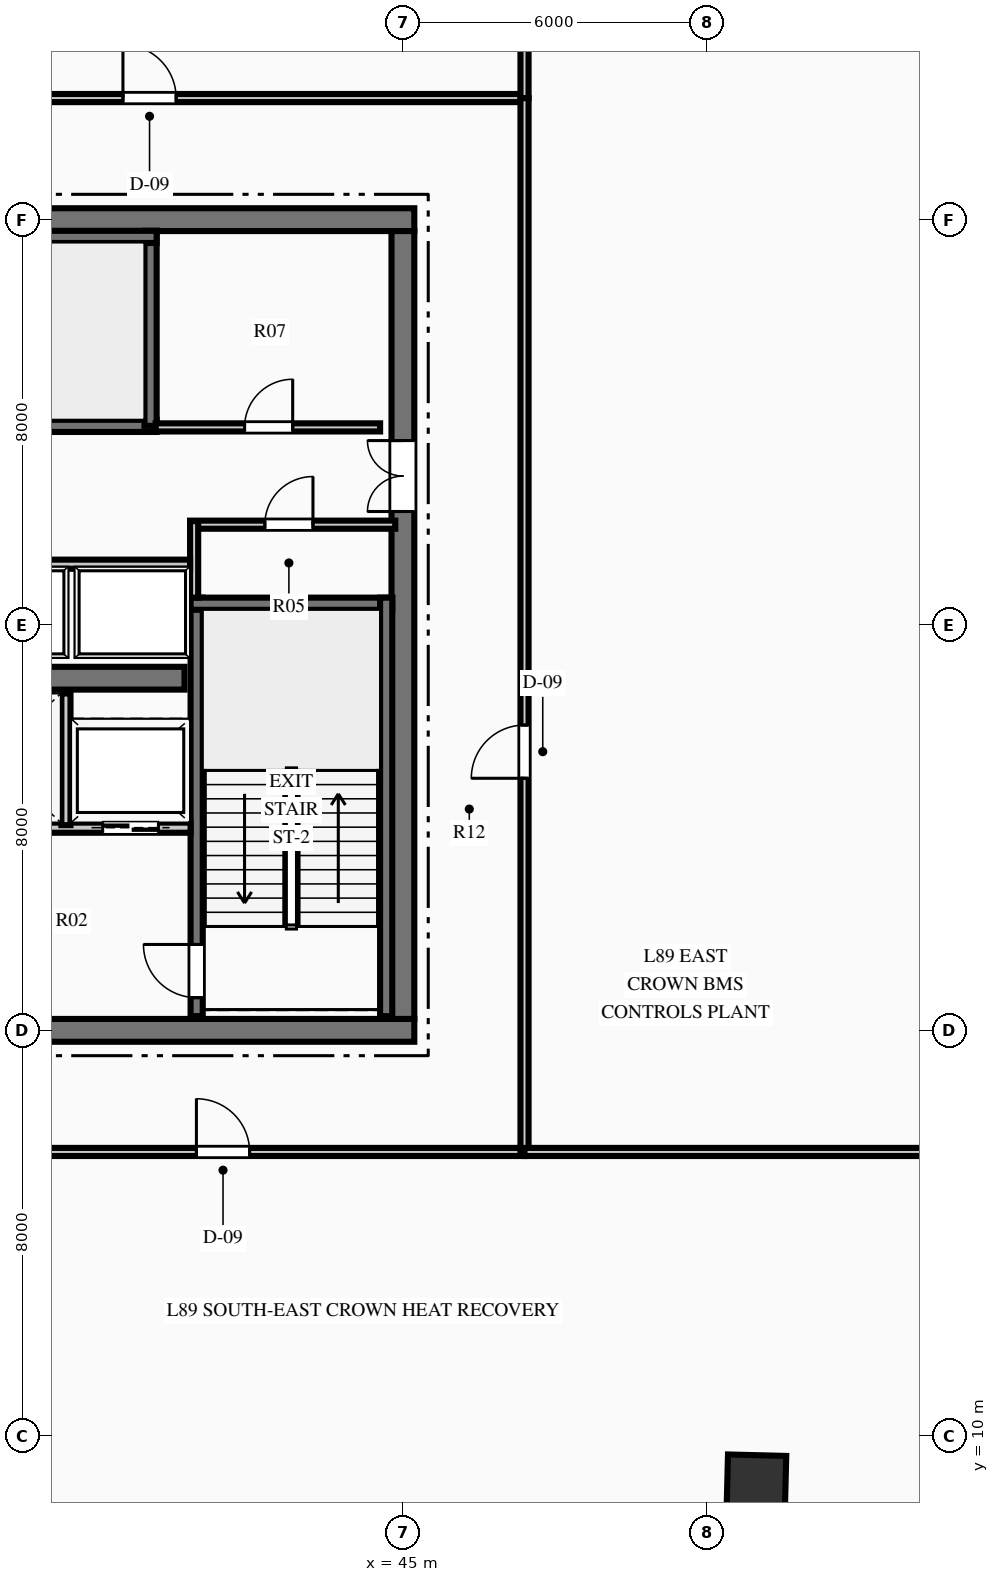
"""IFC4 building model, lengths in metres.
Left out: names, types, materials, properties, quantities, classifications, styles, units other than length and angle.
Written with IfcOpenShell. Run it as: python <this file> out.ifc"""

import sys

from ifc_helpers import new_model, si_unit, direction, frame, frame_2d, origin, origin_2d, place, context, subcontext, project, spatial, rectangle, hollow_rectangle, extrude, element, fill, save


model = new_model("IFC4")
c1 = context("Model", 3, precision=1e-05, world=origin(), true_north=direction((0.0, 1.0)))
c2 = subcontext(c1, "Body", "Model", "MODEL_VIEW")
j1 = project(units=[si_unit("LENGTHUNIT", "METRE"), si_unit("PLANEANGLEUNIT", "RADIAN")], contexts=[c1])
p1 = place(None, origin())
s1 = spatial("IfcSite", under=j1, at=p1, CompositionType="ELEMENT")
p2 = place(p1, origin())
s2 = spatial("IfcBuilding", under=s1, at=p2, CompositionType="ELEMENT")
p3 = place(p2, frame((0.0, 0.0, 352.2)))
s3 = spatial("IfcBuildingStorey", under=s2, at=p3, CompositionType="ELEMENT", Elevation=352.2)
p4 = place(p3, frame((26.775, 18.0, 0.0), z_axis=(0.0, 0.0, 1.0), x_axis=(1.0, 0.0, 0.0)))
e1 = element("IfcWall", 1, at=p4, inside=s3, PredefinedType="SHEAR", context=c2, shape_type="SweptSolid", body=[
    extrude(rectangle(XDim=18.45, YDim=0.45, at=frame_2d((9.225, 0.0))), origin(), (0.0, 0.0, 1.0), 4.2),
])
p5 = place(p4, frame((7.325, 0.0, 0.0)))
e2 = element("IfcOpeningElement", 2, at=p5, cuts=e1, PredefinedType="OPENING", context=c2, shape_type="SweptSolid", body=[
    extrude(rectangle(XDim=1.1, YDim=2.15, at=frame_2d((0.55, 1.075))), frame((0.0, 0.235, 0.0), z_axis=(0.0, -1.0, 0.0), x_axis=(1.0, 0.0, 0.0)), (0.0, 0.0, 1.0), 0.47),
])
p6 = place(p4, frame((9.505, 0.0, 0.0)))
e3 = element("IfcOpeningElement", 3, at=p6, cuts=e1, PredefinedType="OPENING", context=c2, shape_type="SweptSolid", body=[
    extrude(rectangle(XDim=1.1, YDim=2.15, at=frame_2d((0.55, 1.075))), frame((0.0, 0.235, 0.0), z_axis=(0.0, -1.0, 0.0), x_axis=(1.0, 0.0, 0.0)), (0.0, 0.0, 1.0), 0.47),
])
p7 = place(p3, frame((26.775, 34.0, 0.0), z_axis=(0.0, 0.0, 1.0), x_axis=(1.0, 0.0, 0.0)))
e4 = element("IfcWall", 4, at=p7, inside=s3, PredefinedType="SHEAR", context=c2, shape_type="SweptSolid", body=[
    extrude(rectangle(XDim=18.45, YDim=0.45, at=frame_2d((9.225, 0.0))), origin(), (0.0, 0.0, 1.0), 4.2),
])
p8 = place(p3, frame((45.0, 18.225, 0.0), z_axis=(0.0, 0.0, 1.0), x_axis=(0.0, 1.0, 0.0)))
e5 = element("IfcWall", 5, at=p8, inside=s3, PredefinedType="SHEAR", context=c2, shape_type="SweptSolid", body=[
    extrude(rectangle(XDim=15.55, YDim=0.45, at=frame_2d((7.775, 0.0))), origin(), (0.0, 0.0, 1.0), 4.2),
])
p9 = place(p8, frame((10.015, 0.0, 0.0)))
e6 = element("IfcOpeningElement", 6, at=p9, cuts=e5, PredefinedType="OPENING", context=c2, shape_type="SweptSolid", body=[
    extrude(rectangle(XDim=1.4, YDim=2.2, at=frame_2d((0.7, 1.1))), frame((0.0, 0.235, 0.0), z_axis=(0.0, -1.0, 0.0), x_axis=(1.0, 0.0, 0.0)), (0.0, 0.0, 1.0), 0.47),
])
p10 = place(p3, frame((31.31, 24.95, 0.0), z_axis=(0.0, 0.0, 1.0), x_axis=(1.0, 0.0, 0.0)))
e7 = element("IfcWall", 7, at=p10, inside=s3, PredefinedType="SHEAR", context=c2, shape_type="SweptSolid", body=[
    extrude(rectangle(XDim=9.38, YDim=0.45, at=frame_2d((4.69, 0.0))), origin(), (0.0, 0.0, 1.0), 4.2),
])
p11 = place(p3, frame((40.93, 18.28, 0.0), z_axis=(0.0, 0.0, 1.0), x_axis=(0.0, 1.0, 0.0)))
e8 = element("IfcWall", 8, at=p11, inside=s3, PredefinedType="SHEAR", context=c2, shape_type="SweptSolid", body=[
    extrude(rectangle(XDim=8.26, YDim=0.24, at=frame_2d((4.13, 0.0))), origin(), (0.0, 0.0, 1.0), 4.2),
])
p12 = place(p11, frame((0.365, 0.0, 0.0)))
e9 = element("IfcOpeningElement", 9, at=p12, cuts=e8, PredefinedType="OPENING", context=c2, shape_type="SweptSolid", body=[
    extrude(rectangle(XDim=1.05, YDim=2.15, at=frame_2d((0.525, 1.075))), frame((0.0, 0.13, 0.0), z_axis=(0.0, -1.0, 0.0), x_axis=(1.0, 0.0, 0.0)), (0.0, 0.0, 1.0), 0.26),
])
p13 = place(p3, frame((40.81, 26.42, 0.0), z_axis=(0.0, 0.0, 1.0), x_axis=(1.0, 0.0, 0.0)))
e10 = element("IfcWall", 10, at=p13, inside=s3, PredefinedType="SHEAR", context=c2, shape_type="SweptSolid", body=[
    extrude(rectangle(XDim=3.98, YDim=0.24, at=frame_2d((1.99, 0.0))), origin(), (0.0, 0.0, 1.0), 4.2),
])
p14 = place(p3, frame((44.67, 18.28, 0.0), z_axis=(0.0, 0.0, 1.0), x_axis=(0.0, 1.0, 0.0)))
e11 = element("IfcWall", 11, at=p14, inside=s3, PredefinedType="SHEAR", context=c2, shape_type="SweptSolid", body=[
    extrude(rectangle(XDim=8.26, YDim=0.24, at=frame_2d((4.13, 0.0))), origin(), (0.0, 0.0, 1.0), 4.2),
])
p15 = place(p3, frame((31.76, 29.93, 0.0), z_axis=(0.0, 0.0, 1.0), x_axis=(1.0, 0.0, 0.0)))
e12 = element("IfcWall", 12, at=p15, inside=s3, PredefinedType="SHEAR", context=c2, shape_type="SweptSolid", body=[
    extrude(rectangle(XDim=8.38, YDim=0.24, at=frame_2d((4.19, 0.0))), origin(), (0.0, 0.0, 1.0), 4.2),
])
p16 = place(p15, frame((0.565, 0.0, 0.0)))
e13 = element("IfcOpeningElement", 13, at=p16, cuts=e12, PredefinedType="OPENING", context=c2, shape_type="SweptSolid", body=[
    extrude(rectangle(XDim=1.05, YDim=2.15, at=frame_2d((0.525, 1.075))), frame((0.0, 0.13, 0.0), z_axis=(0.0, -1.0, 0.0), x_axis=(1.0, 0.0, 0.0)), (0.0, 0.0, 1.0), 0.26),
])
p17 = place(p3, frame((40.02, 29.93, 0.0), z_axis=(0.0, 0.0, 1.0), x_axis=(0.0, 1.0, 0.0)))
e14 = element("IfcWall", 14, at=p17, inside=s3, PredefinedType="SHEAR", context=c2, shape_type="SweptSolid", body=[
    extrude(rectangle(XDim=3.85, YDim=0.24, at=frame_2d((1.925, 0.0))), origin(), (0.0, 0.0, 1.0), 4.2),
])
p18 = place(p3, frame((37.85, 33.66, 0.0), z_axis=(0.0, 0.0, 1.0), x_axis=(1.0, 0.0, 0.0)))
e15 = element("IfcWall", 15, at=p18, inside=s3, PredefinedType="SHEAR", context=c2, shape_type="SweptSolid", body=[
    extrude(rectangle(XDim=2.29, YDim=0.24, at=frame_2d((1.145, 0.0))), origin(), (0.0, 0.0, 1.0), 4.2),
])
p19 = place(p3, frame((51.976, 9.04, 0.0), z_axis=(0.0, 0.0, 1.0), x_axis=(0.025304572866, 0.999679788028, 0.0)))
e16 = element("IfcColumn", 16, at=p19, inside=s3, PredefinedType="COLUMN", context=c2, shape_type="SweptSolid", body=[
    extrude(hollow_rectangle(XDim=1.15, YDim=1.15, WallThickness=0.05, at=origin_2d()), origin(), (0.0, 0.0, 1.0), 4.2),
])
p20 = place(p3, frame((36.12, 22.0, 0.0), z_axis=(0.0, 0.0, 1.0), x_axis=(1.0, 0.0, 0.0)))
e17 = element("IfcWall", 17, at=p20, inside=s3, PredefinedType="PARTITIONING", context=c2, shape_type="SweptSolid", body=[
    extrude(rectangle(XDim=4.69, YDim=0.2, at=frame_2d((2.345, 0.0))), origin(), (0.0, 0.0, 1.0), 3.8),
])
p21 = place(p20, frame((2.955, 0.0, 0.0)))
e18 = element("IfcOpeningElement", 18, at=p21, cuts=e17, PredefinedType="OPENING", context=c2, shape_type="SweptSolid", body=[
    extrude(rectangle(XDim=1.1, YDim=2.15, at=frame_2d((0.55, 1.075))), frame((0.0, 0.11, 0.0), z_axis=(0.0, -1.0, 0.0), x_axis=(1.0, 0.0, 0.0)), (0.0, 0.0, 1.0), 0.22),
])
p22 = place(p20, frame((0.08, 0.0, 0.0)))
e19 = element("IfcOpeningElement", 19, at=p22, cuts=e17, PredefinedType="OPENING", context=c2, shape_type="SweptSolid", body=[
    extrude(rectangle(XDim=1.4, YDim=2.2, at=frame_2d((0.7, 1.1))), frame((0.0, 0.11, 0.0), z_axis=(0.0, -1.0, 0.0), x_axis=(1.0, 0.0, 0.0)), (0.0, 0.0, 1.0), 0.22),
])
p23 = place(p3, frame((38.35, 22.05, 0.0), z_axis=(0.0, 0.0, 1.0), x_axis=(0.0, 1.0, 0.0)))
e20 = element("IfcWall", 20, at=p23, inside=s3, PredefinedType="PARTITIONING", context=c2, shape_type="SweptSolid", body=[
    extrude(rectangle(XDim=2.6, YDim=0.18, at=frame_2d((1.3, 0.0))), origin(), (0.0, 0.0, 1.0), 3.8),
])
p24 = place(p3, frame((40.8, 27.98, 0.0), z_axis=(0.0, 0.0, 1.0), x_axis=(1.0, 0.0, 0.0)))
e21 = element("IfcWall", 21, at=p24, inside=s3, PredefinedType="PARTITIONING", context=c2, shape_type="SweptSolid", body=[
    extrude(rectangle(XDim=4.05, YDim=0.16, at=frame_2d((2.025, 0.0))), origin(), (0.0, 0.0, 1.0), 3.8),
])
p25 = place(p24, frame((1.475, 0.0, 0.0)))
e22 = element("IfcOpeningElement", 22, at=p25, cuts=e21, PredefinedType="OPENING", context=c2, shape_type="SweptSolid", body=[
    extrude(rectangle(XDim=0.95, YDim=2.15, at=frame_2d((0.475, 1.075))), frame((0.0, 0.09, 0.0), z_axis=(0.0, -1.0, 0.0), x_axis=(1.0, 0.0, 0.0)), (0.0, 0.0, 1.0), 0.18),
])
p26 = place(p3, frame((40.88, 26.54, 0.0), z_axis=(0.0, 0.0, 1.0), x_axis=(0.0, 1.0, 0.0)))
e23 = element("IfcWall", 23, at=p26, inside=s3, PredefinedType="PARTITIONING", context=c2, shape_type="SweptSolid", body=[
    extrude(rectangle(XDim=1.51, YDim=0.16, at=frame_2d((0.755, 0.0))), origin(), (0.0, 0.0, 1.0), 3.8),
])
p27 = place(p3, frame((40.12, 29.9, 0.0), z_axis=(0.0, 0.0, 1.0), x_axis=(1.0, 0.0, 0.0)))
e24 = element("IfcWall", 24, at=p27, inside=s3, PredefinedType="PARTITIONING", context=c2, shape_type="SweptSolid", body=[
    extrude(rectangle(XDim=4.43, YDim=0.16, at=frame_2d((2.215, 0.0))), origin(), (0.0, 0.0, 1.0), 3.8),
])
p28 = place(p27, frame((1.755, 0.0, 0.0)))
e25 = element("IfcOpeningElement", 25, at=p28, cuts=e24, PredefinedType="OPENING", context=c2, shape_type="SweptSolid", body=[
    extrude(rectangle(XDim=0.95, YDim=2.15, at=frame_2d((0.475, 1.075))), frame((0.0, 0.09, 0.0), z_axis=(0.0, -1.0, 0.0), x_axis=(1.0, 0.0, 0.0)), (0.0, 0.0, 1.0), 0.18),
])
p29 = place(p3, frame((31.2, 27.2, 0.0), z_axis=(0.0, 0.0, 1.0), x_axis=(1.0, 0.0, 0.0)))
e26 = element("IfcWall", 26, at=p29, inside=s3, PredefinedType="PARTITIONING", context=c2, shape_type="SweptSolid", body=[
    extrude(rectangle(XDim=9.6, YDim=0.18, at=frame_2d((4.8, 0.0))), origin(), (0.0, 0.0, 1.0), 3.8),
])
p30 = place(p29, frame((4.325, 0.0, 0.0)))
e27 = element("IfcOpeningElement", 27, at=p30, cuts=e26, PredefinedType="OPENING", context=c2, shape_type="SweptSolid", body=[
    extrude(rectangle(XDim=0.95, YDim=2.15, at=frame_2d((0.475, 1.075))), frame((0.0, 0.1, 0.0), z_axis=(0.0, -1.0, 0.0), x_axis=(1.0, 0.0, 0.0)), (0.0, 0.0, 1.0), 0.2),
])
p31 = place(p3, frame((24.6, 15.6, 0.0), z_axis=(0.0, 0.0, 1.0), x_axis=(1.0, 0.0, 0.0)))
e28 = element("IfcWall", 28, at=p31, inside=s3, PredefinedType="PARTITIONING", context=c2, shape_type="SweptSolid", body=[
    extrude(rectangle(XDim=22.8, YDim=0.16, at=frame_2d((11.4, 0.0))), origin(), (0.0, 0.0, 1.0), 3.8),
])
p32 = place(p31, frame((6.875, 0.0, 0.0)))
e29 = element("IfcOpeningElement", 29, at=p32, cuts=e28, PredefinedType="OPENING", context=c2, shape_type="SweptSolid", body=[
    extrude(rectangle(XDim=1.05, YDim=2.15, at=frame_2d((0.525, 1.075))), frame((0.0, 0.09, 0.0), z_axis=(0.0, -1.0, 0.0), x_axis=(1.0, 0.0, 0.0)), (0.0, 0.0, 1.0), 0.18),
])
p33 = place(p31, frame((16.325, 0.0, 0.0)))
e30 = element("IfcOpeningElement", 30, at=p33, cuts=e28, PredefinedType="OPENING", context=c2, shape_type="SweptSolid", body=[
    extrude(rectangle(XDim=1.05, YDim=2.15, at=frame_2d((0.525, 1.075))), frame((0.0, 0.09, 0.0), z_axis=(0.0, -1.0, 0.0), x_axis=(1.0, 0.0, 0.0)), (0.0, 0.0, 1.0), 0.18),
])
p34 = place(p3, frame((24.6, 36.4, 0.0), z_axis=(0.0, 0.0, 1.0), x_axis=(1.0, 0.0, 0.0)))
e31 = element("IfcWall", 31, at=p34, inside=s3, PredefinedType="PARTITIONING", context=c2, shape_type="SweptSolid", body=[
    extrude(rectangle(XDim=22.8, YDim=0.16, at=frame_2d((11.4, 0.0))), origin(), (0.0, 0.0, 1.0), 3.8),
])
p35 = place(p34, frame((5.425, 0.0, 0.0)))
e32 = element("IfcOpeningElement", 32, at=p35, cuts=e31, PredefinedType="OPENING", context=c2, shape_type="SweptSolid", body=[
    extrude(rectangle(XDim=1.05, YDim=2.15, at=frame_2d((0.525, 1.075))), frame((0.0, 0.09, 0.0), z_axis=(0.0, -1.0, 0.0), x_axis=(1.0, 0.0, 0.0)), (0.0, 0.0, 1.0), 0.18),
])
p36 = place(p34, frame((14.875, 0.0, 0.0)))
e33 = element("IfcOpeningElement", 33, at=p36, cuts=e31, PredefinedType="OPENING", context=c2, shape_type="SweptSolid", body=[
    extrude(rectangle(XDim=1.05, YDim=2.15, at=frame_2d((0.525, 1.075))), frame((0.0, 0.09, 0.0), z_axis=(0.0, -1.0, 0.0), x_axis=(1.0, 0.0, 0.0)), (0.0, 0.0, 1.0), 0.18),
])
p37 = place(p3, frame((47.4, 15.6, 0.0), z_axis=(0.0, 0.0, 1.0), x_axis=(0.0, 1.0, 0.0)))
e34 = element("IfcWall", 34, at=p37, inside=s3, PredefinedType="PARTITIONING", context=c2, shape_type="SweptSolid", body=[
    extrude(rectangle(XDim=20.8, YDim=0.16, at=frame_2d((10.4, 0.0))), origin(), (0.0, 0.0, 1.0), 3.8),
])
p38 = place(p37, frame((7.375, 0.0, 0.0)))
e35 = element("IfcOpeningElement", 35, at=p38, cuts=e34, PredefinedType="OPENING", context=c2, shape_type="SweptSolid", body=[
    extrude(rectangle(XDim=1.05, YDim=2.15, at=frame_2d((0.525, 1.075))), frame((0.0, 0.09, 0.0), z_axis=(0.0, -1.0, 0.0), x_axis=(1.0, 0.0, 0.0)), (0.0, 0.0, 1.0), 0.18),
])
p39 = place(p3, frame((47.4, 15.6, 0.0), z_axis=(0.0, 0.0, 1.0), x_axis=(1.0, 0.0, 0.0)))
e36 = element("IfcWall", 36, at=p39, inside=s3, PredefinedType="PARTITIONING", context=c2, shape_type="SweptSolid", body=[
    extrude(rectangle(XDim=12.036, YDim=0.16, at=frame_2d((6.018, 0.0))), origin(), (0.0, 0.0, 1.0), 3.8),
])
p40 = place(p3, frame((47.4, 36.4, 0.0), z_axis=(0.0, 0.0, 1.0), x_axis=(0.0, 1.0, 0.0)))
e37 = element("IfcWall", 37, at=p40, inside=s3, PredefinedType="PARTITIONING", context=c2, shape_type="SweptSolid", body=[
    extrude(rectangle(XDim=13.277, YDim=0.16, at=frame_2d((6.639, 0.0))), origin(), (0.0, 0.0, 1.0), 3.8),
])
p41 = place(p25, origin())
e38 = element("IfcDoor", 38, at=p41, inside=s3, OperationType="SINGLE_SWING_RIGHT", PredefinedType="DOOR", context=c2, shape_type="SweptSolid", body=[
    extrude(rectangle(XDim=0.95, YDim=2.15, at=frame_2d((0.475, 1.075))), frame((0.0, 0.025, 0.0), z_axis=(0.0, -1.0, 0.0), x_axis=(1.0, 0.0, 0.0)), (0.0, 0.0, 1.0), 0.05),
])
fill(e22, e38)
p42 = place(p28, origin())
e39 = element("IfcDoor", 39, at=p42, inside=s3, OperationType="SINGLE_SWING_RIGHT", PredefinedType="DOOR", context=c2, shape_type="SweptSolid", body=[
    extrude(rectangle(XDim=0.95, YDim=2.15, at=frame_2d((0.475, 1.075))), frame((0.0, 0.025, 0.0), z_axis=(0.0, -1.0, 0.0), x_axis=(1.0, 0.0, 0.0)), (0.0, 0.0, 1.0), 0.05),
])
fill(e25, e39)
p43 = place(p12, origin())
e40 = element("IfcDoor", 40, at=p43, inside=s3, OperationType="SINGLE_SWING_RIGHT", PredefinedType="DOOR", context=c2, shape_type="SweptSolid", body=[
    extrude(rectangle(XDim=1.05, YDim=2.15, at=frame_2d((0.525, 1.075))), frame((0.0, 0.025, 0.0), z_axis=(0.0, -1.0, 0.0), x_axis=(1.0, 0.0, 0.0)), (0.0, 0.0, 1.0), 0.05),
])
fill(e9, e40)
p44 = place(p9, origin())
e41 = element("IfcDoor", 41, at=p44, inside=s3, OperationType="DOUBLE_DOOR_SINGLE_SWING", PredefinedType="DOOR", context=c2, shape_type="SweptSolid", body=[
    extrude(rectangle(XDim=1.4, YDim=2.2, at=frame_2d((0.7, 1.1))), frame((0.0, 0.025, 0.0), z_axis=(0.0, -1.0, 0.0), x_axis=(1.0, 0.0, 0.0)), (0.0, 0.0, 1.0), 0.05),
])
fill(e6, e41)
p45 = place(p33, origin())
e42 = element("IfcDoor", 42, at=p45, inside=s3, OperationType="SINGLE_SWING_LEFT", PredefinedType="DOOR", context=c2, shape_type="SweptSolid", body=[
    extrude(rectangle(XDim=1.05, YDim=2.15, at=frame_2d((0.525, 1.075))), frame((0.0, 0.025, 0.0), z_axis=(0.0, -1.0, 0.0), x_axis=(1.0, 0.0, 0.0)), (0.0, 0.0, 1.0), 0.05),
])
fill(e30, e42)
p46 = place(p38, origin())
e43 = element("IfcDoor", 43, at=p46, inside=s3, OperationType="SINGLE_SWING_LEFT", PredefinedType="DOOR", context=c2, shape_type="SweptSolid", body=[
    extrude(rectangle(XDim=1.05, YDim=2.15, at=frame_2d((0.525, 1.075))), frame((0.0, 0.025, 0.0), z_axis=(0.0, -1.0, 0.0), x_axis=(1.0, 0.0, 0.0)), (0.0, 0.0, 1.0), 0.05),
])
fill(e35, e43)
p47 = place(p36, origin())
e44 = element("IfcDoor", 44, at=p47, inside=s3, OperationType="SINGLE_SWING_LEFT", PredefinedType="DOOR", context=c2, shape_type="SweptSolid", body=[
    extrude(rectangle(XDim=1.05, YDim=2.15, at=frame_2d((0.525, 1.075))), frame((0.0, 0.025, 0.0), z_axis=(0.0, -1.0, 0.0), x_axis=(1.0, 0.0, 0.0)), (0.0, 0.0, 1.0), 0.05),
])
fill(e33, e44)
p48 = place(p21, origin())
e45 = element("IfcDoor", 45, at=p48, inside=s3, OperationType="SLIDING_TO_LEFT", PredefinedType="DOOR", context=c2, shape_type="SweptSolid", body=[
    extrude(rectangle(XDim=1.1, YDim=2.15, at=frame_2d((0.55, 1.075))), frame((0.0, 0.025, 0.0), z_axis=(0.0, -1.0, 0.0), x_axis=(1.0, 0.0, 0.0)), (0.0, 0.0, 1.0), 0.05),
])
fill(e18, e45)
save(model, sys.argv[1])
